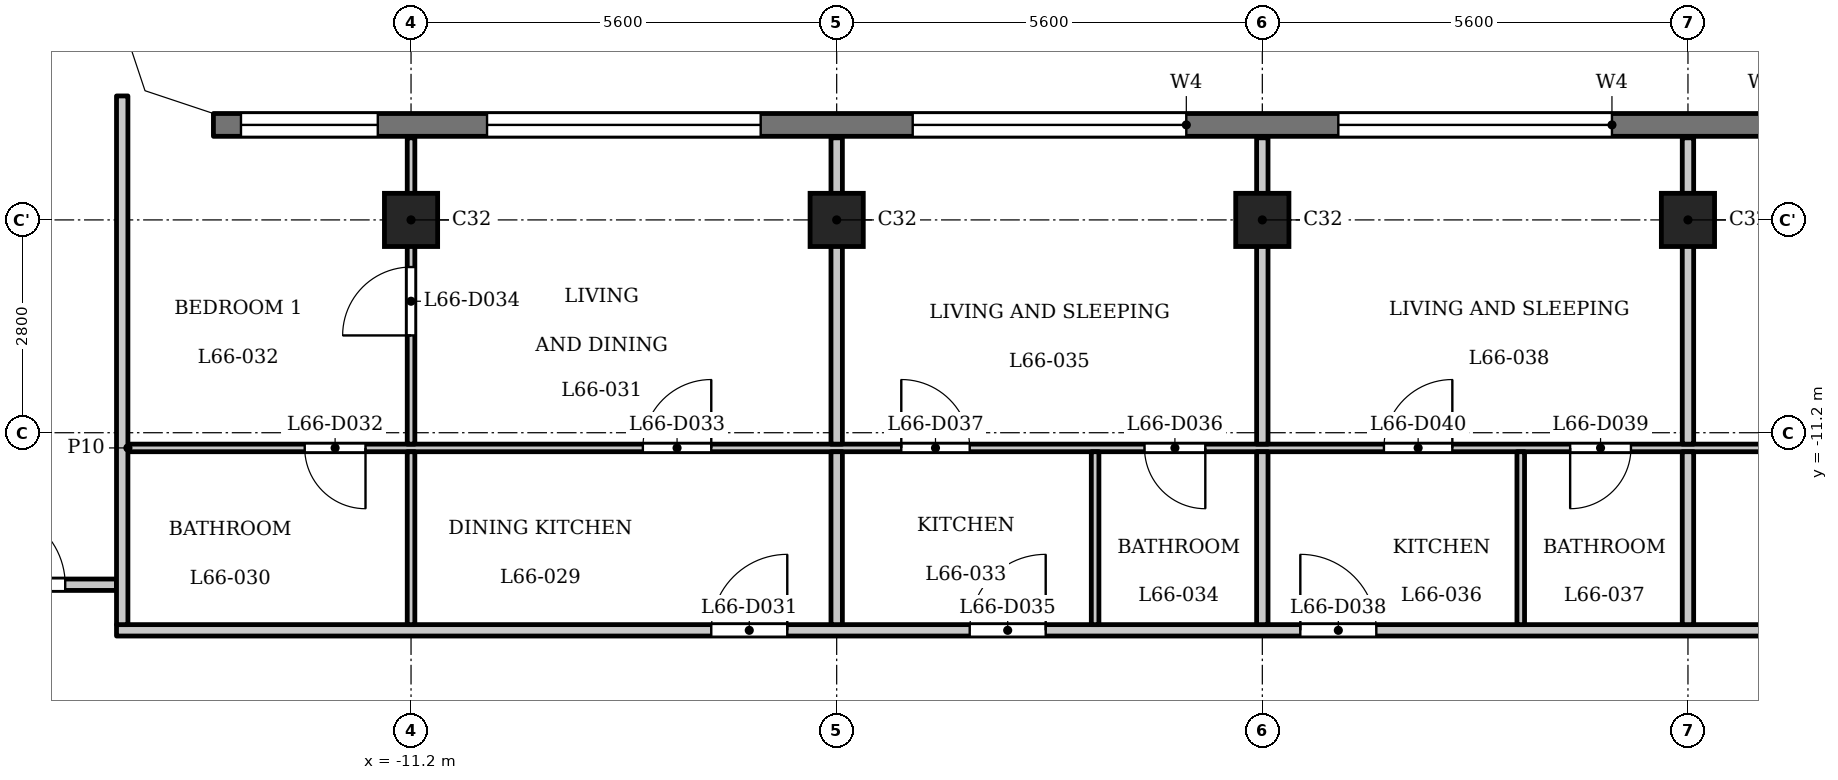
"""IFC4 building model, lengths in metres.
Left out: names, types, materials, properties, quantities, classifications, styles, units other than length and angle.
Written with IfcOpenShell. Run it as: python <this file> out.ifc"""

import sys

from ifc_helpers import new_model, si_unit, direction, frame, frame_2d, origin, origin_2d, place, context, subcontext, project, spatial, polyline, rectangle, outline, extrude, element, fill, save


model = new_model("IFC4")
c1 = context("Model", 3, precision=1e-05, world=origin(), true_north=direction((0.0, 1.0)))
c2 = subcontext(c1, "Body", "Model", "MODEL_VIEW")
j1 = project(units=[si_unit("LENGTHUNIT", "METRE"), si_unit("PLANEANGLEUNIT", "RADIAN")], contexts=[c1])
p1 = place(None, origin())
s1 = spatial("IfcSite", under=j1, at=p1, CompositionType="ELEMENT")
p2 = place(p1, origin())
s2 = spatial("IfcBuilding", under=s1, at=p2, CompositionType="ELEMENT")
p3 = place(p2, frame((0.0, 0.0, 255.7)))
s3 = spatial("IfcBuildingStorey", under=s2, at=p3, CompositionType="ELEMENT", Elevation=255.7)
for number, where, z_axis, x_axis in (
    (1, (-11.2, -8.4, 0.0), (0.0, 0.0, 1.0), (1.0, 0.0, 0.0)),
    (2, (-5.6, -8.4, 0.0), (0.0, 0.0, 1.0), (1.0, 0.0, 0.0)),
    (3, (0.0, -8.4, 0.0), (0.0, 0.0, 1.0), (1.0, 0.0, 0.0)),
    (4, (5.6, -8.4, 0.0), (0.0, 0.0, 1.0), (1.0, 0.0, 0.0)),
):
    element("IfcColumn", number, at=place(p3, frame(where, z_axis=z_axis, x_axis=x_axis)), inside=s3, PredefinedType="COLUMN", context=c2, shape_type="SweptSolid", body=[
        extrude(rectangle(XDim=0.7, YDim=0.7, at=origin_2d()), origin(), (0.0, 0.0, 1.0), 3.5),
    ])
p4 = place(p3, frame((13.8, -7.15, 0.0), z_axis=(0.0, 0.0, 1.0), x_axis=(-1.0, 0.0, 0.0)))
e5 = element("IfcWall", 5, at=p4, inside=s3, PredefinedType="SOLIDWALL", context=c2, shape_type="SweptSolid", body=[
    extrude(rectangle(XDim=27.6, YDim=0.3, at=frame_2d((13.8, 0.0))), origin(), (0.0, 0.0, 1.0), 3.2),
])
p5 = place(p4, frame((0.363, 0.0, 0.9)))
e6 = element("IfcOpeningElement", 6, at=p5, cuts=e5, PredefinedType="OPENING", context=c2, shape_type="SweptSolid", body=[
    extrude(rectangle(XDim=1.8, YDim=1.25, at=frame_2d((0.9, 0.625))), frame((0.0, 0.16, 0.0), z_axis=(0.0, -1.0, 0.0), x_axis=(1.0, 0.0, 0.0)), (0.0, 0.0, 1.0), 0.32),
])
p6 = place(p4, frame((3.6, 0.0, 1.2)))
e7 = element("IfcOpeningElement", 7, at=p6, cuts=e5, PredefinedType="OPENING", context=c2, shape_type="SweptSolid", body=[
    extrude(rectangle(XDim=3.6, YDim=0.95, at=frame_2d((1.8, 0.475))), frame((0.0, 0.16, 0.0), z_axis=(0.0, -1.0, 0.0), x_axis=(1.0, 0.0, 0.0)), (0.0, 0.0, 1.0), 0.32),
])
p7 = place(p4, frame((9.2, 0.0, 1.2)))
e8 = element("IfcOpeningElement", 8, at=p7, cuts=e5, PredefinedType="OPENING", context=c2, shape_type="SweptSolid", body=[
    extrude(rectangle(XDim=3.6, YDim=0.95, at=frame_2d((1.8, 0.475))), frame((0.0, 0.16, 0.0), z_axis=(0.0, -1.0, 0.0), x_axis=(1.0, 0.0, 0.0)), (0.0, 0.0, 1.0), 0.32),
])
p8 = place(p4, frame((14.8, 0.0, 1.2)))
e9 = element("IfcOpeningElement", 9, at=p8, cuts=e5, PredefinedType="OPENING", context=c2, shape_type="SweptSolid", body=[
    extrude(rectangle(XDim=3.6, YDim=0.95, at=frame_2d((1.8, 0.475))), frame((0.0, 0.16, 0.0), z_axis=(0.0, -1.0, 0.0), x_axis=(1.0, 0.0, 0.0)), (0.0, 0.0, 1.0), 0.32),
])
p9 = place(p4, frame((20.4, 0.0, 1.2)))
e10 = element("IfcOpeningElement", 10, at=p9, cuts=e5, PredefinedType="OPENING", context=c2, shape_type="SweptSolid", body=[
    extrude(rectangle(XDim=3.6, YDim=0.95, at=frame_2d((1.8, 0.475))), frame((0.0, 0.16, 0.0), z_axis=(0.0, -1.0, 0.0), x_axis=(1.0, 0.0, 0.0)), (0.0, 0.0, 1.0), 0.32),
])
p10 = place(p4, frame((25.438, 0.0, 0.9)))
e11 = element("IfcOpeningElement", 11, at=p10, cuts=e5, PredefinedType="OPENING", context=c2, shape_type="SweptSolid", body=[
    extrude(rectangle(XDim=1.8, YDim=1.25, at=frame_2d((0.9, 0.625))), frame((0.0, 0.16, 0.0), z_axis=(0.0, -1.0, 0.0), x_axis=(1.0, 0.0, 0.0)), (0.0, 0.0, 1.0), 0.32),
])
p11 = place(p3, frame((-15.075, -13.8, 0.0), z_axis=(0.0, 0.0, 1.0), x_axis=(1.0, 0.0, 0.0)))
e12 = element("IfcWall", 12, at=p11, inside=s3, PredefinedType="PARTITIONING", context=c2, shape_type="SweptSolid", body=[
    extrude(rectangle(XDim=30.15, YDim=0.15, at=frame_2d((15.075, 0.0))), origin(), (0.0, 0.0, 1.0), 3.2),
])
p12 = place(p11, frame((7.825, 0.0, 0.0)))
e13 = element("IfcOpeningElement", 13, at=p12, cuts=e12, PredefinedType="OPENING", context=c2, shape_type="SweptSolid", body=[
    extrude(rectangle(XDim=1.0, YDim=2.1, at=frame_2d((0.5, 1.05))), frame((0.0, 0.085, 0.0), z_axis=(0.0, -1.0, 0.0), x_axis=(1.0, 0.0, 0.0)), (0.0, 0.0, 1.0), 0.17),
])
p13 = place(p11, frame((11.225, 0.0, 0.0)))
e14 = element("IfcOpeningElement", 14, at=p13, cuts=e12, PredefinedType="OPENING", context=c2, shape_type="SweptSolid", body=[
    extrude(rectangle(XDim=1.0, YDim=2.1, at=frame_2d((0.5, 1.05))), frame((0.0, 0.085, 0.0), z_axis=(0.0, -1.0, 0.0), x_axis=(1.0, 0.0, 0.0)), (0.0, 0.0, 1.0), 0.17),
])
p14 = place(p11, frame((15.575, 0.0, 0.0)))
e15 = element("IfcOpeningElement", 15, at=p14, cuts=e12, PredefinedType="OPENING", context=c2, shape_type="SweptSolid", body=[
    extrude(rectangle(XDim=1.0, YDim=2.1, at=frame_2d((0.5, 1.05))), frame((0.0, 0.085, 0.0), z_axis=(0.0, -1.0, 0.0), x_axis=(1.0, 0.0, 0.0)), (0.0, 0.0, 1.0), 0.17),
])
p15 = place(p11, frame((28.424, 0.0, 0.0)))
e16 = element("IfcOpeningElement", 16, at=p15, cuts=e12, PredefinedType="OPENING", context=c2, shape_type="SweptSolid", body=[
    extrude(rectangle(XDim=1.0, YDim=2.1, at=frame_2d((0.5, 1.05))), frame((0.0, 0.085, 0.0), z_axis=(0.0, -1.0, 0.0), x_axis=(1.0, 0.0, 0.0)), (0.0, 0.0, 1.0), 0.17),
])
p16 = place(p3, frame((-17.4, -13.2, 0.0), z_axis=(0.0, 0.0, 1.0), x_axis=(1.0, 0.0, 0.0)))
e17 = element("IfcWall", 17, at=p16, inside=s3, PredefinedType="PARTITIONING", context=c2, shape_type="SweptSolid", body=[
    extrude(rectangle(XDim=2.325, YDim=0.15, at=frame_2d((1.163, 0.0))), origin(), (0.0, 0.0, 1.0), 3.2),
])
p17 = place(p16, frame((0.65, 0.0, 0.0)))
e18 = element("IfcOpeningElement", 18, at=p17, cuts=e17, PredefinedType="OPENING", context=c2, shape_type="SweptSolid", body=[
    extrude(rectangle(XDim=1.0, YDim=2.1, at=frame_2d((0.5, 1.05))), frame((0.0, 0.085, 0.0), z_axis=(0.0, -1.0, 0.0), x_axis=(1.0, 0.0, 0.0)), (0.0, 0.0, 1.0), 0.17),
])
p18 = place(p3, frame((-14.925, -11.4, 0.0), z_axis=(0.0, 0.0, 1.0), x_axis=(1.0, 0.0, 0.0)))
e19 = element("IfcWall", 19, at=p18, inside=s3, PredefinedType="PARTITIONING", context=c2, shape_type="SweptSolid", body=[
    extrude(rectangle(XDim=29.85, YDim=0.1, at=frame_2d((14.925, 0.0))), origin(), (0.0, 0.0, 1.0), 3.2),
])
p19 = place(p18, frame((2.326, 0.0, 0.0)))
e20 = element("IfcOpeningElement", 20, at=p19, cuts=e19, PredefinedType="OPENING", context=c2, shape_type="SweptSolid", body=[
    extrude(rectangle(XDim=0.8, YDim=2.1, at=frame_2d((0.4, 1.05))), frame((0.0, 0.06, 0.0), z_axis=(0.0, -1.0, 0.0), x_axis=(1.0, 0.0, 0.0)), (0.0, 0.0, 1.0), 0.12),
])
p20 = place(p18, frame((6.775, 0.0, 0.0)))
e21 = element("IfcOpeningElement", 21, at=p20, cuts=e19, PredefinedType="OPENING", context=c2, shape_type="SweptSolid", body=[
    extrude(rectangle(XDim=0.9, YDim=2.1, at=frame_2d((0.45, 1.05))), frame((0.0, 0.06, 0.0), z_axis=(0.0, -1.0, 0.0), x_axis=(1.0, 0.0, 0.0)), (0.0, 0.0, 1.0), 0.12),
])
p21 = place(p18, frame((13.375, 0.0, 0.0)))
e22 = element("IfcOpeningElement", 22, at=p21, cuts=e19, PredefinedType="OPENING", context=c2, shape_type="SweptSolid", body=[
    extrude(rectangle(XDim=0.8, YDim=2.1, at=frame_2d((0.4, 1.05))), frame((0.0, 0.06, 0.0), z_axis=(0.0, -1.0, 0.0), x_axis=(1.0, 0.0, 0.0)), (0.0, 0.0, 1.0), 0.12),
])
p22 = place(p18, frame((10.175, 0.0, 0.0)))
e23 = element("IfcOpeningElement", 23, at=p22, cuts=e19, PredefinedType="OPENING", context=c2, shape_type="SweptSolid", body=[
    extrude(rectangle(XDim=0.9, YDim=2.1, at=frame_2d((0.45, 1.05))), frame((0.0, 0.06, 0.0), z_axis=(0.0, -1.0, 0.0), x_axis=(1.0, 0.0, 0.0)), (0.0, 0.0, 1.0), 0.12),
])
p23 = place(p18, frame((18.975, 0.0, 0.0)))
e24 = element("IfcOpeningElement", 24, at=p23, cuts=e19, PredefinedType="OPENING", context=c2, shape_type="SweptSolid", body=[
    extrude(rectangle(XDim=0.8, YDim=2.1, at=frame_2d((0.4, 1.05))), frame((0.0, 0.06, 0.0), z_axis=(0.0, -1.0, 0.0), x_axis=(1.0, 0.0, 0.0)), (0.0, 0.0, 1.0), 0.12),
])
p24 = place(p18, frame((16.525, 0.0, 0.0)))
e25 = element("IfcOpeningElement", 25, at=p24, cuts=e19, PredefinedType="OPENING", context=c2, shape_type="SweptSolid", body=[
    extrude(rectangle(XDim=0.9, YDim=2.1, at=frame_2d((0.45, 1.05))), frame((0.0, 0.06, 0.0), z_axis=(0.0, -1.0, 0.0), x_axis=(1.0, 0.0, 0.0)), (0.0, 0.0, 1.0), 0.12),
])
p25 = place(p18, frame((24.675, 0.0, 0.0)))
e26 = element("IfcOpeningElement", 26, at=p25, cuts=e19, PredefinedType="OPENING", context=c2, shape_type="SweptSolid", body=[
    extrude(rectangle(XDim=0.8, YDim=2.1, at=frame_2d((0.4, 1.05))), frame((0.0, 0.06, 0.0), z_axis=(0.0, -1.0, 0.0), x_axis=(1.0, 0.0, 0.0)), (0.0, 0.0, 1.0), 0.12),
])
p26 = place(p18, frame((27.374, 0.0, 0.0)))
e27 = element("IfcOpeningElement", 27, at=p26, cuts=e19, PredefinedType="OPENING", context=c2, shape_type="SweptSolid", body=[
    extrude(rectangle(XDim=0.9, YDim=2.1, at=frame_2d((0.45, 1.05))), frame((0.0, 0.06, 0.0), z_axis=(0.0, -1.0, 0.0), x_axis=(1.0, 0.0, 0.0)), (0.0, 0.0, 1.0), 0.12),
])
p27 = place(p3, frame((-15.0, -13.725, 0.0), z_axis=(0.0, 0.0, 1.0), x_axis=(0.0, 1.0, 0.0)))
e28 = element("IfcWall", 28, at=p27, inside=s3, PredefinedType="PARTITIONING", context=c2, shape_type="SweptSolid", body=[
    extrude(rectangle(XDim=6.956, YDim=0.15, at=frame_2d((3.478, 0.0))), origin(), (0.0, 0.0, 1.0), 3.2),
])
p28 = place(p3, frame((-11.2, -13.725, 0.0), z_axis=(0.0, 0.0, 1.0), x_axis=(0.0, 1.0, 0.0)))
e29 = element("IfcWall", 29, at=p28, inside=s3, PredefinedType="PARTITIONING", context=c2, shape_type="SweptSolid", body=[
    extrude(rectangle(XDim=2.275, YDim=0.1, at=frame_2d((1.138, 0.0))), origin(), (0.0, 0.0, 1.0), 3.2),
])
p29 = place(p3, frame((-11.2, -11.35, 0.0), z_axis=(0.0, 0.0, 1.0), x_axis=(0.0, 1.0, 0.0)))
e30 = element("IfcWall", 30, at=p29, inside=s3, PredefinedType="PARTITIONING", context=c2, shape_type="SweptSolid", body=[
    extrude(rectangle(XDim=4.03, YDim=0.1, at=frame_2d((2.015, 0.0))), origin(), (0.0, 0.0, 1.0), 3.2),
])
p30 = place(p29, frame((1.43, 0.0, 0.0)))
e31 = element("IfcOpeningElement", 31, at=p30, cuts=e30, PredefinedType="OPENING", context=c2, shape_type="SweptSolid", body=[
    extrude(rectangle(XDim=0.9, YDim=2.1, at=frame_2d((0.45, 1.05))), frame((0.0, 0.06, 0.0), z_axis=(0.0, -1.0, 0.0), x_axis=(1.0, 0.0, 0.0)), (0.0, 0.0, 1.0), 0.12),
])
p31 = place(p3, frame((-5.6, -13.725, 0.0), z_axis=(0.0, 0.0, 1.0), x_axis=(0.0, 1.0, 0.0)))
e32 = element("IfcWall", 32, at=p31, inside=s3, PredefinedType="PARTITIONING", context=c2, shape_type="SweptSolid", body=[
    extrude(rectangle(XDim=2.275, YDim=0.15, at=frame_2d((1.138, 0.0))), origin(), (0.0, 0.0, 1.0), 3.2),
])
p32 = place(p3, frame((-5.6, -11.35, 0.0), z_axis=(0.0, 0.0, 1.0), x_axis=(0.0, 1.0, 0.0)))
e33 = element("IfcWall", 33, at=p32, inside=s3, PredefinedType="PARTITIONING", context=c2, shape_type="SweptSolid", body=[
    extrude(rectangle(XDim=4.03, YDim=0.15, at=frame_2d((2.015, 0.0))), origin(), (0.0, 0.0, 1.0), 3.2),
])
p33 = place(p3, frame((-2.2, -13.725, 0.0), z_axis=(0.0, 0.0, 1.0), x_axis=(0.0, 1.0, 0.0)))
e34 = element("IfcWall", 34, at=p33, inside=s3, PredefinedType="PARTITIONING", context=c2, shape_type="SweptSolid", body=[
    extrude(rectangle(XDim=2.275, YDim=0.1, at=frame_2d((1.138, 0.0))), origin(), (0.0, 0.0, 1.0), 3.2),
])
p34 = place(p3, frame((0.0, -13.725, 0.0), z_axis=(0.0, 0.0, 1.0), x_axis=(0.0, 1.0, 0.0)))
e35 = element("IfcWall", 35, at=p34, inside=s3, PredefinedType="PARTITIONING", context=c2, shape_type="SweptSolid", body=[
    extrude(rectangle(XDim=2.275, YDim=0.15, at=frame_2d((1.138, 0.0))), origin(), (0.0, 0.0, 1.0), 3.2),
])
p35 = place(p3, frame((0.0, -11.35, 0.0), z_axis=(0.0, 0.0, 1.0), x_axis=(0.0, 1.0, 0.0)))
e36 = element("IfcWall", 36, at=p35, inside=s3, PredefinedType="PARTITIONING", context=c2, shape_type="SweptSolid", body=[
    extrude(rectangle(XDim=4.03, YDim=0.15, at=frame_2d((2.015, 0.0))), origin(), (0.0, 0.0, 1.0), 3.2),
])
p36 = place(p3, frame((3.4, -13.725, 0.0), z_axis=(0.0, 0.0, 1.0), x_axis=(0.0, 1.0, 0.0)))
e37 = element("IfcWall", 37, at=p36, inside=s3, PredefinedType="PARTITIONING", context=c2, shape_type="SweptSolid", body=[
    extrude(rectangle(XDim=2.275, YDim=0.1, at=frame_2d((1.138, 0.0))), origin(), (0.0, 0.0, 1.0), 3.2),
])
p37 = place(p3, frame((5.6, -13.725, 0.0), z_axis=(0.0, 0.0, 1.0), x_axis=(0.0, 1.0, 0.0)))
e38 = element("IfcWall", 38, at=p37, inside=s3, PredefinedType="PARTITIONING", context=c2, shape_type="SweptSolid", body=[
    extrude(rectangle(XDim=2.275, YDim=0.15, at=frame_2d((1.138, 0.0))), origin(), (0.0, 0.0, 1.0), 3.2),
])
p38 = place(p3, frame((5.6, -11.35, 0.0), z_axis=(0.0, 0.0, 1.0), x_axis=(0.0, 1.0, 0.0)))
e39 = element("IfcWall", 39, at=p38, inside=s3, PredefinedType="PARTITIONING", context=c2, shape_type="SweptSolid", body=[
    extrude(rectangle(XDim=4.03, YDim=0.15, at=frame_2d((2.015, 0.0))), origin(), (0.0, 0.0, 1.0), 3.2),
])
p39 = place(p3, origin())
e40 = element("IfcWall", 40, at=p39, inside=s3, PredefinedType="SOLIDWALL", context=c2, shape_type="SweptSolid", body=[
    extrude(outline(polyline([(-14.937, -6.937), (-13.849, -7.3), (-13.8, -7.3), (-13.8, -7.0), (-14.7, -6.7), (-15.0, -5.8), (-15.3, -5.8), (-15.3, -5.849), (-14.937, -6.937)])), origin(), (0.0, 0.0, 1.0), 3.2),
])
p40 = place(p17, origin())
e41 = element("IfcDoor", 41, at=p40, inside=s3, OperationType="SINGLE_SWING_RIGHT", PredefinedType="DOOR", context=c2, shape_type="SweptSolid", body=[
    extrude(rectangle(XDim=1.0, YDim=2.1, at=frame_2d((0.5, 1.05))), frame((0.0, 0.025, 0.0), z_axis=(0.0, -1.0, 0.0), x_axis=(1.0, 0.0, 0.0)), (0.0, 0.0, 1.0), 0.05),
])
fill(e18, e41)
p41 = place(p12, origin())
e42 = element("IfcDoor", 42, at=p41, inside=s3, OperationType="SINGLE_SWING_LEFT", PredefinedType="DOOR", context=c2, shape_type="SweptSolid", body=[
    extrude(rectangle(XDim=1.0, YDim=2.1, at=frame_2d((0.5, 1.05))), frame((0.0, 0.025, 0.0), z_axis=(0.0, -1.0, 0.0), x_axis=(1.0, 0.0, 0.0)), (0.0, 0.0, 1.0), 0.05),
])
fill(e13, e42)
p42 = place(p19, origin())
e43 = element("IfcDoor", 43, at=p42, inside=s3, OperationType="SINGLE_SWING_RIGHT", PredefinedType="DOOR", context=c2, shape_type="SweptSolid", body=[
    extrude(rectangle(XDim=0.8, YDim=2.1, at=frame_2d((0.4, 1.05))), frame((0.0, 0.025, 0.0), z_axis=(0.0, -1.0, 0.0), x_axis=(1.0, 0.0, 0.0)), (0.0, 0.0, 1.0), 0.05),
])
fill(e20, e43)
p43 = place(p20, origin())
e44 = element("IfcDoor", 44, at=p43, inside=s3, OperationType="SINGLE_SWING_LEFT", PredefinedType="DOOR", context=c2, shape_type="SweptSolid", body=[
    extrude(rectangle(XDim=0.9, YDim=2.1, at=frame_2d((0.45, 1.05))), frame((0.0, 0.025, 0.0), z_axis=(0.0, -1.0, 0.0), x_axis=(1.0, 0.0, 0.0)), (0.0, 0.0, 1.0), 0.05),
])
fill(e21, e44)
p44 = place(p30, origin())
e45 = element("IfcDoor", 45, at=p44, inside=s3, OperationType="SINGLE_SWING_RIGHT", PredefinedType="DOOR", context=c2, shape_type="SweptSolid", body=[
    extrude(rectangle(XDim=0.9, YDim=2.1, at=frame_2d((0.45, 1.05))), frame((0.0, 0.025, 0.0), z_axis=(0.0, -1.0, 0.0), x_axis=(1.0, 0.0, 0.0)), (0.0, 0.0, 1.0), 0.05),
])
fill(e31, e45)
p45 = place(p13, origin())
e46 = element("IfcDoor", 46, at=p45, inside=s3, OperationType="SINGLE_SWING_LEFT", PredefinedType="DOOR", context=c2, shape_type="SweptSolid", body=[
    extrude(rectangle(XDim=1.0, YDim=2.1, at=frame_2d((0.5, 1.05))), frame((0.0, 0.025, 0.0), z_axis=(0.0, -1.0, 0.0), x_axis=(1.0, 0.0, 0.0)), (0.0, 0.0, 1.0), 0.05),
])
fill(e14, e46)
p46 = place(p21, origin())
e47 = element("IfcDoor", 47, at=p46, inside=s3, OperationType="SINGLE_SWING_RIGHT", PredefinedType="DOOR", context=c2, shape_type="SweptSolid", body=[
    extrude(rectangle(XDim=0.8, YDim=2.1, at=frame_2d((0.4, 1.05))), frame((0.0, 0.025, 0.0), z_axis=(0.0, -1.0, 0.0), x_axis=(1.0, 0.0, 0.0)), (0.0, 0.0, 1.0), 0.05),
])
fill(e22, e47)
p47 = place(p22, origin())
e48 = element("IfcDoor", 48, at=p47, inside=s3, OperationType="SINGLE_SWING_RIGHT", PredefinedType="DOOR", context=c2, shape_type="SweptSolid", body=[
    extrude(rectangle(XDim=0.9, YDim=2.1, at=frame_2d((0.45, 1.05))), frame((0.0, 0.025, 0.0), z_axis=(0.0, -1.0, 0.0), x_axis=(1.0, 0.0, 0.0)), (0.0, 0.0, 1.0), 0.05),
])
fill(e23, e48)
p48 = place(p14, origin())
e49 = element("IfcDoor", 49, at=p48, inside=s3, OperationType="SINGLE_SWING_RIGHT", PredefinedType="DOOR", context=c2, shape_type="SweptSolid", body=[
    extrude(rectangle(XDim=1.0, YDim=2.1, at=frame_2d((0.5, 1.05))), frame((0.0, 0.025, 0.0), z_axis=(0.0, -1.0, 0.0), x_axis=(1.0, 0.0, 0.0)), (0.0, 0.0, 1.0), 0.05),
])
fill(e15, e49)
p49 = place(p23, origin())
e50 = element("IfcDoor", 50, at=p49, inside=s3, OperationType="SINGLE_SWING_LEFT", PredefinedType="DOOR", context=c2, shape_type="SweptSolid", body=[
    extrude(rectangle(XDim=0.8, YDim=2.1, at=frame_2d((0.4, 1.05))), frame((0.0, 0.025, 0.0), z_axis=(0.0, -1.0, 0.0), x_axis=(1.0, 0.0, 0.0)), (0.0, 0.0, 1.0), 0.05),
])
fill(e24, e50)
p50 = place(p24, origin())
e51 = element("IfcDoor", 51, at=p50, inside=s3, OperationType="SINGLE_SWING_LEFT", PredefinedType="DOOR", context=c2, shape_type="SweptSolid", body=[
    extrude(rectangle(XDim=0.9, YDim=2.1, at=frame_2d((0.45, 1.05))), frame((0.0, 0.025, 0.0), z_axis=(0.0, -1.0, 0.0), x_axis=(1.0, 0.0, 0.0)), (0.0, 0.0, 1.0), 0.05),
])
fill(e25, e51)
p51 = place(p7, origin())
e52 = element("IfcWindow", 52, at=p51, inside=s3, PartitioningType="SINGLE_PANEL", PredefinedType="WINDOW", context=c2, shape_type="SweptSolid", body=[
    extrude(rectangle(XDim=3.6, YDim=0.95, at=frame_2d((1.8, 0.475))), frame((0.0, 0.03, 0.0), z_axis=(0.0, -1.0, 0.0), x_axis=(1.0, 0.0, 0.0)), (0.0, 0.0, 1.0), 0.06),
])
fill(e8, e52)
p52 = place(p8, origin())
e53 = element("IfcWindow", 53, at=p52, inside=s3, PartitioningType="SINGLE_PANEL", PredefinedType="WINDOW", context=c2, shape_type="SweptSolid", body=[
    extrude(rectangle(XDim=3.6, YDim=0.95, at=frame_2d((1.8, 0.475))), frame((0.0, 0.03, 0.0), z_axis=(0.0, -1.0, 0.0), x_axis=(1.0, 0.0, 0.0)), (0.0, 0.0, 1.0), 0.06),
])
fill(e9, e53)
p53 = place(p9, origin())
e54 = element("IfcWindow", 54, at=p53, inside=s3, PartitioningType="SINGLE_PANEL", PredefinedType="WINDOW", context=c2, shape_type="SweptSolid", body=[
    extrude(rectangle(XDim=3.6, YDim=0.95, at=frame_2d((1.8, 0.475))), frame((0.0, 0.03, 0.0), z_axis=(0.0, -1.0, 0.0), x_axis=(1.0, 0.0, 0.0)), (0.0, 0.0, 1.0), 0.06),
])
fill(e10, e54)
p54 = place(p10, origin())
e55 = element("IfcWindow", 55, at=p54, inside=s3, PartitioningType="SINGLE_PANEL", PredefinedType="WINDOW", context=c2, shape_type="SweptSolid", body=[
    extrude(rectangle(XDim=1.8, YDim=1.25, at=frame_2d((0.9, 0.625))), frame((0.0, 0.03, 0.0), z_axis=(0.0, -1.0, 0.0), x_axis=(1.0, 0.0, 0.0)), (0.0, 0.0, 1.0), 0.06),
])
fill(e11, e55)
save(model, sys.argv[1])
